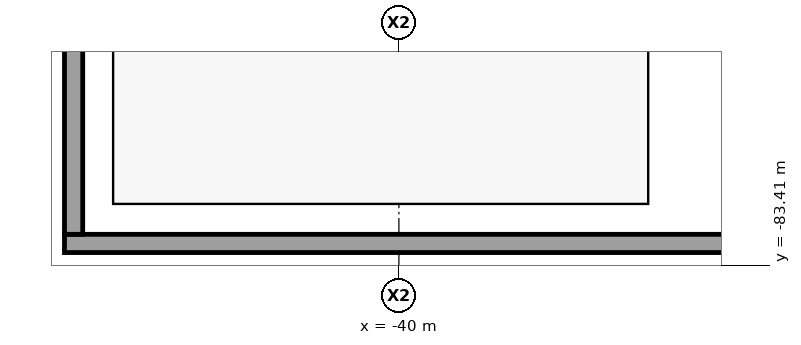
"""IFC4 building model, lengths in metres.
Left out: names, types, materials, properties, quantities, classifications, styles, units other than length and angle.
Written with IfcOpenShell. Run it as: python <this file> out.ifc"""

import sys

from ifc_helpers import new_model, si_unit, direction, frame, origin, place, context, subcontext, project, spatial, polyline, outline, extrude, element, save


model = new_model("IFC4")
c1 = context("Model", 3, precision=1e-05, world=origin(), true_north=direction((0.0, 1.0)))
c2 = subcontext(c1, "Body", "Model", "MODEL_VIEW")
j1 = project(units=[si_unit("LENGTHUNIT", "METRE"), si_unit("PLANEANGLEUNIT", "RADIAN")], contexts=[c1])
p1 = place(None, origin())
s1 = spatial("IfcSite", under=j1, at=p1, CompositionType="ELEMENT")
p2 = place(p1, origin())
s2 = spatial("IfcBuilding", under=s1, at=p2, CompositionType="ELEMENT")
p3 = place(p2, frame((0.0, 0.0, -9.0)))
s3 = spatial("IfcBuildingStorey", under=s2, at=p3, CompositionType="ELEMENT", Elevation=-9.0)
p4 = place(p3, frame((-51.0, -82.7, 0.0), z_axis=(0.0, 0.0, 1.0), x_axis=(1.0, 0.0, 0.0)))
e1 = element("IfcWall", 1, at=p4, inside=s3, PredefinedType="SOLIDWALL", context=c2, shape_type="SweptSolid", body=[
    extrude(outline(polyline([(0.0, -0.3), (0.0, 0.3), (0.6, 0.3), (101.4, 0.3), (102.0, 0.3), (102.0, -0.3), (0.0, -0.3)])), origin(), (0.0, 0.0, 1.0), 4.5),
])
p5 = place(p3, frame((-50.7, -1.0, 0.0), z_axis=(0.0, 0.0, 1.0), x_axis=(0.0, -1.0, 0.0)))
e2 = element("IfcWall", 2, at=p5, inside=s3, PredefinedType="SOLIDWALL", context=c2, shape_type="SweptSolid", body=[
    extrude(outline(polyline([(81.4, 0.3), (81.4, -0.3), (0.6, -0.3), (0.6, 0.3), (81.4, 0.3)])), origin(), (0.0, 0.0, 1.0), 4.5),
])
save(model, sys.argv[1])
